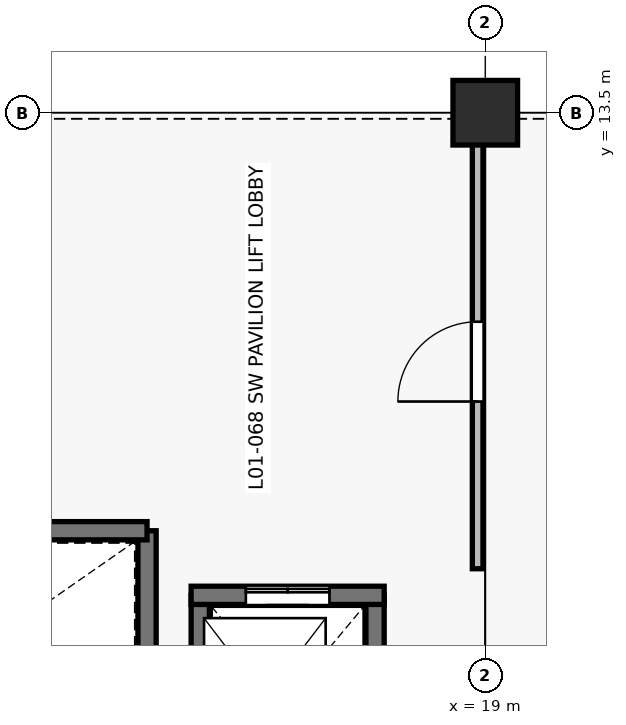
"""IFC4 building model, lengths in metres.
Left out: names, types, materials, properties, quantities, classifications, styles, units other than length and angle.
Written with IfcOpenShell. Run it as: python <this file> out.ifc"""

import sys

from ifc_helpers import new_model, si_unit, direction, frame, frame_2d, origin, origin_2d, place, context, subcontext, project, spatial, rectangle, extrude, element, fill, save


model = new_model("IFC4")
c1 = context("Model", 3, precision=1e-05, world=origin(), true_north=direction((0.0, 1.0)))
c2 = subcontext(c1, "Body", "Model", "MODEL_VIEW")
j1 = project(units=[si_unit("LENGTHUNIT", "METRE"), si_unit("PLANEANGLEUNIT", "RADIAN")], contexts=[c1])
p1 = place(None, origin())
s1 = spatial("IfcSite", under=j1, at=p1, CompositionType="ELEMENT")
p2 = place(p1, origin())
s2 = spatial("IfcBuilding", under=s1, at=p2, CompositionType="ELEMENT")
p3 = place(p2, frame((0.0, 0.0, 4.8)))
s3 = spatial("IfcBuildingStorey", under=s2, at=p3, CompositionType="ELEMENT", Elevation=4.8)
p4 = place(p3, frame((19.0, 13.5, 0.0), z_axis=(0.0, 0.0, 1.0), x_axis=(1.0, 0.0, 0.0)))
e1 = element("IfcColumn", 1, at=p4, inside=s3, PredefinedType="COLUMN", context=c2, shape_type="SweptSolid", body=[
    extrude(rectangle(XDim=0.85, YDim=0.85, at=origin_2d()), origin(), (0.0, 0.0, 1.0), 4.2),
])
for number, where, z_axis, x_axis in (
    (2, (15.25, 4.45, 0.0), (0.0, 0.0, 1.0), (0.0, 1.0, 0.0)),
    (3, (17.55, 7.15, 0.0), (0.0, 0.0, 1.0), (0.0, -1.0, 0.0)),
):
    element("IfcWall", number, at=place(p3, frame(where, z_axis=z_axis, x_axis=x_axis)), inside=s3, PredefinedType="SHEAR", context=c2, shape_type="SweptSolid", body=[
        extrude(rectangle(XDim=2.7, YDim=0.24, at=frame_2d((1.35, 0.0))), origin(), (0.0, 0.0, 1.0), 4.2),
    ])
p5 = place(p3, frame((15.13, 7.15, 0.0), z_axis=(0.0, 0.0, 1.0), x_axis=(1.0, 0.0, 0.0)))
e4 = element("IfcWall", 4, at=p5, inside=s3, PredefinedType="SHEAR", context=c2, shape_type="SweptSolid", body=[
    extrude(rectangle(XDim=2.54, YDim=0.24, at=frame_2d((1.27, 0.0))), origin(), (0.0, 0.0, 1.0), 4.2),
])
p6 = place(p5, frame((0.72, 0.0, 0.0)))
e5 = element("IfcOpeningElement", 5, at=p6, cuts=e4, PredefinedType="OPENING", context=c2, shape_type="SweptSolid", body=[
    extrude(rectangle(XDim=1.1, YDim=2.15, at=frame_2d((0.55, 1.075))), frame((0.0, 0.13, 0.0), z_axis=(0.0, -1.0, 0.0), x_axis=(1.0, 0.0, 0.0)), (0.0, 0.0, 1.0), 0.26),
])
p7 = place(p3, frame((14.55, 4.0, 0.0), z_axis=(0.0, 0.0, 1.0), x_axis=(0.0, 1.0, 0.0)))
e6 = element("IfcWall", 6, at=p7, inside=s3, PredefinedType="SHEAR", context=c2, shape_type="SweptSolid", body=[
    extrude(rectangle(XDim=4.0, YDim=0.24, at=frame_2d((2.0, 0.0))), origin(), (0.0, 0.0, 1.0), 4.2),
])
p8 = place(p3, frame((7.45, 8.0, 0.0), z_axis=(0.0, 0.0, 1.0), x_axis=(1.0, 0.0, 0.0)))
e7 = element("IfcWall", 7, at=p8, inside=s3, PredefinedType="SHEAR", context=c2, shape_type="SweptSolid", body=[
    extrude(rectangle(XDim=7.1, YDim=0.24, at=frame_2d((3.55, 0.0))), origin(), (0.0, 0.0, 1.0), 4.2),
])
p9 = place(p8, frame((0.18, 0.0, 0.0)))
e8 = element("IfcOpeningElement", 8, at=p9, cuts=e7, PredefinedType="OPENING", context=c2, shape_type="SweptSolid", body=[
    extrude(rectangle(XDim=1.0, YDim=2.15, at=frame_2d((0.5, 1.075))), frame((0.0, 0.13, 0.0), z_axis=(0.0, -1.0, 0.0), x_axis=(1.0, 0.0, 0.0)), (0.0, 0.0, 1.0), 0.26),
])
p10 = place(p3, frame((18.9, 7.5, 0.0), z_axis=(0.0, 0.0, 1.0), x_axis=(0.0, 1.0, 0.0)))
e9 = element("IfcWall", 9, at=p10, inside=s3, PredefinedType="PARTITIONING", context=c2, shape_type="SweptSolid", body=[
    extrude(rectangle(XDim=5.9, YDim=0.14, at=frame_2d((2.95, 0.0))), origin(), (0.0, 0.0, 1.0), 2.475),
])
p11 = place(p10, frame((2.2, 0.0, 0.0)))
e10 = element("IfcOpeningElement", 10, at=p11, cuts=e9, PredefinedType="OPENING", context=c2, shape_type="SweptSolid", body=[
    extrude(rectangle(XDim=1.05, YDim=2.1, at=frame_2d((0.525, 1.05))), frame((0.0, 0.08, 0.0), z_axis=(0.0, -1.0, 0.0), x_axis=(1.0, 0.0, 0.0)), (0.0, 0.0, 1.0), 0.16),
])
p12 = place(p6, origin())
e11 = element("IfcDoor", 11, at=p12, inside=s3, OperationType="DOUBLE_DOOR_SLIDING", PredefinedType="USERDEFINED", context=c2, shape_type="SweptSolid", body=[
    extrude(rectangle(XDim=1.1, YDim=2.15, at=frame_2d((0.55, 1.075))), frame((0.0, 0.025, 0.0), z_axis=(0.0, -1.0, 0.0), x_axis=(1.0, 0.0, 0.0)), (0.0, 0.0, 1.0), 0.05),
])
fill(e5, e11)
p13 = place(p11, origin())
e12 = element("IfcDoor", 12, at=p13, inside=s3, OperationType="SINGLE_SWING_LEFT", PredefinedType="DOOR", context=c2, shape_type="SweptSolid", body=[
    extrude(rectangle(XDim=1.05, YDim=2.1, at=frame_2d((0.525, 1.05))), frame((0.0, 0.025, 0.0), z_axis=(0.0, -1.0, 0.0), x_axis=(1.0, 0.0, 0.0)), (0.0, 0.0, 1.0), 0.05),
])
fill(e10, e12)
save(model, sys.argv[1])
